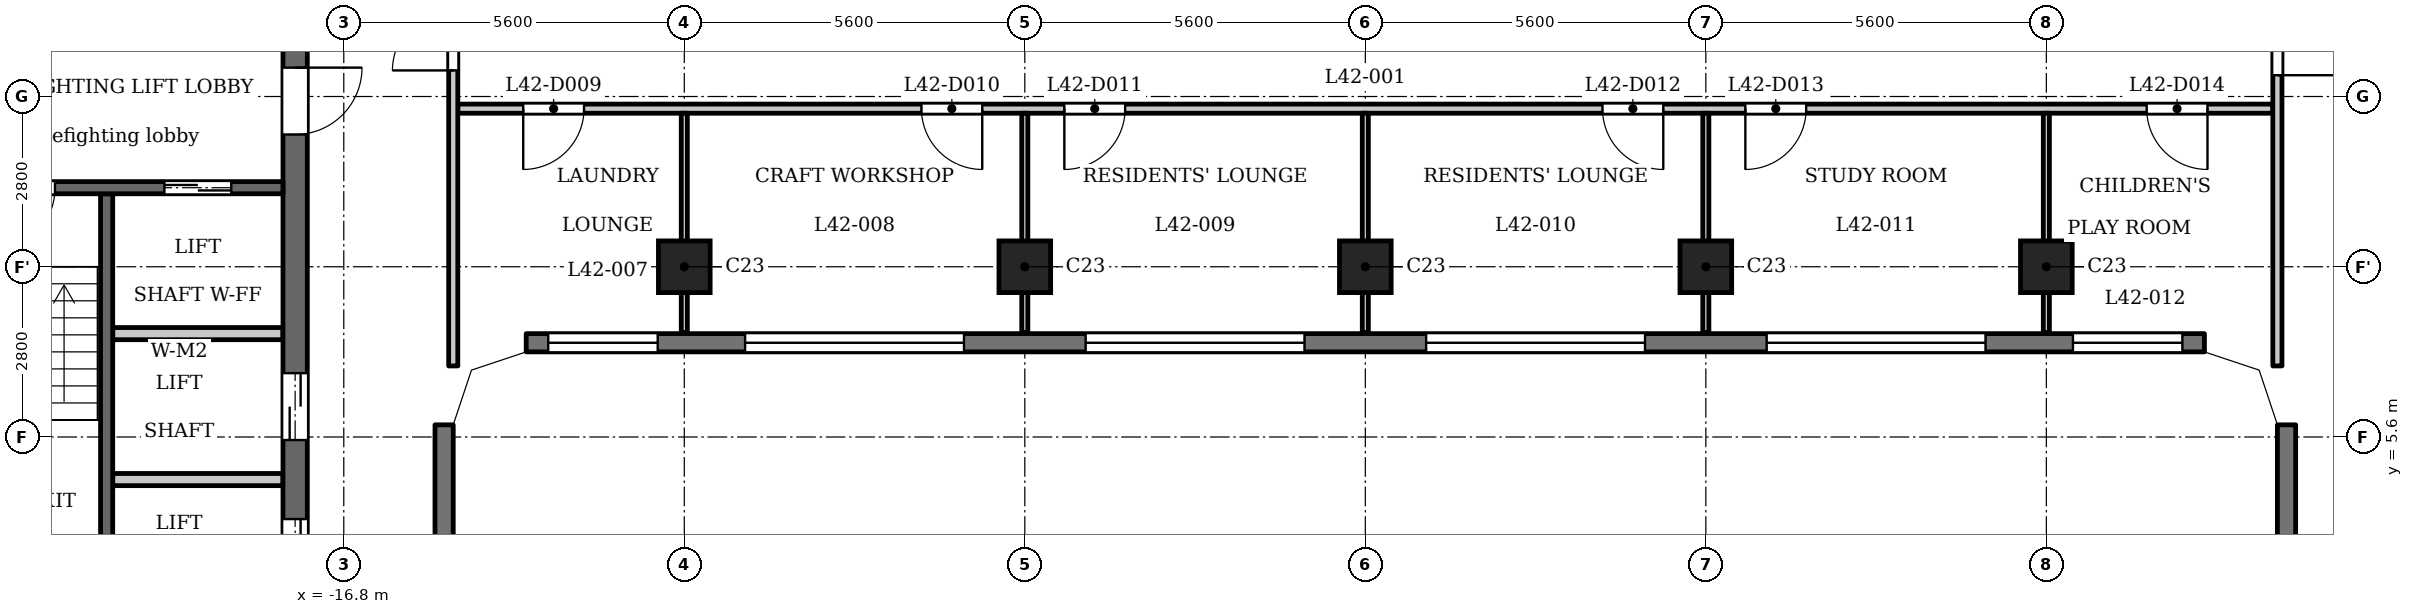
"""IFC4 building model, lengths in metres.
Left out: names, types, materials, properties, quantities, classifications, styles, units other than length and angle.
Written with IfcOpenShell. Run it as: python <this file> out.ifc"""

import sys

from ifc_helpers import new_model, si_unit, direction, frame, frame_2d, origin, origin_2d, place, context, subcontext, project, spatial, polyline, rectangle, outline, extrude, element, fill, save


model = new_model("IFC4")
c1 = context("Model", 3, precision=1e-05, world=origin(), true_north=direction((0.0, 1.0)))
c2 = subcontext(c1, "Body", "Model", "MODEL_VIEW")
j1 = project(units=[si_unit("LENGTHUNIT", "METRE"), si_unit("PLANEANGLEUNIT", "RADIAN")], contexts=[c1])
p1 = place(None, origin())
s1 = spatial("IfcSite", under=j1, at=p1, CompositionType="ELEMENT")
p2 = place(p1, origin())
s2 = spatial("IfcBuilding", under=s1, at=p2, CompositionType="ELEMENT")
p3 = place(p2, frame((0.0, 0.0, 164.1)))
s3 = spatial("IfcBuildingStorey", under=s2, at=p3, CompositionType="ELEMENT", Elevation=164.1)
for number, where, z_axis, x_axis in (
    (1, (-11.2, 8.4, 0.0), (0.0, 0.0, 1.0), (1.0, 0.0, 0.0)),
    (2, (-5.6, 8.4, 0.0), (0.0, 0.0, 1.0), (1.0, 0.0, 0.0)),
    (3, (0.0, 8.4, 0.0), (0.0, 0.0, 1.0), (1.0, 0.0, 0.0)),
    (4, (5.6, 8.4, 0.0), (0.0, 0.0, 1.0), (1.0, 0.0, 0.0)),
    (5, (11.2, 8.4, 0.0), (0.0, 0.0, 1.0), (1.0, 0.0, 0.0)),
):
    element("IfcColumn", number, at=place(p3, frame(where, z_axis=z_axis, x_axis=x_axis)), inside=s3, PredefinedType="COLUMN", context=c2, shape_type="SweptSolid", body=[
        extrude(rectangle(XDim=0.85, YDim=0.85, at=origin_2d()), origin(), (0.0, 0.0, 1.0), 3.5),
    ])
p4 = place(p3, frame((-15.15, -5.8, 0.0), z_axis=(0.0, 0.0, 1.0), x_axis=(0.0, 1.0, 0.0)))
e6 = element("IfcWall", 6, at=p4, inside=s3, PredefinedType="SOLIDWALL", context=c2, shape_type="SweptSolid", body=[
    extrude(rectangle(XDim=11.6, YDim=0.3, at=frame_2d((5.8, 0.0))), origin(), (0.0, 0.0, 1.0), 3.2),
])
p5 = place(p3, frame((-13.8, 7.15, 0.0), z_axis=(0.0, 0.0, 1.0), x_axis=(1.0, 0.0, 0.0)))
e7 = element("IfcWall", 7, at=p5, inside=s3, PredefinedType="SOLIDWALL", context=c2, shape_type="SweptSolid", body=[
    extrude(rectangle(XDim=27.6, YDim=0.3, at=frame_2d((13.8, 0.0))), origin(), (0.0, 0.0, 1.0), 3.2),
])
p6 = place(p5, frame((0.363, 0.0, 0.9)))
e8 = element("IfcOpeningElement", 8, at=p6, cuts=e7, PredefinedType="OPENING", context=c2, shape_type="SweptSolid", body=[
    extrude(rectangle(XDim=1.8, YDim=1.25, at=frame_2d((0.9, 0.625))), frame((0.0, 0.16, 0.0), z_axis=(0.0, -1.0, 0.0), x_axis=(1.0, 0.0, 0.0)), (0.0, 0.0, 1.0), 0.32),
])
p7 = place(p5, frame((3.6, 0.0, 1.2)))
e9 = element("IfcOpeningElement", 9, at=p7, cuts=e7, PredefinedType="OPENING", context=c2, shape_type="SweptSolid", body=[
    extrude(rectangle(XDim=3.6, YDim=0.95, at=frame_2d((1.8, 0.475))), frame((0.0, 0.16, 0.0), z_axis=(0.0, -1.0, 0.0), x_axis=(1.0, 0.0, 0.0)), (0.0, 0.0, 1.0), 0.32),
])
p8 = place(p5, frame((9.2, 0.0, 1.2)))
e10 = element("IfcOpeningElement", 10, at=p8, cuts=e7, PredefinedType="OPENING", context=c2, shape_type="SweptSolid", body=[
    extrude(rectangle(XDim=3.6, YDim=0.95, at=frame_2d((1.8, 0.475))), frame((0.0, 0.16, 0.0), z_axis=(0.0, -1.0, 0.0), x_axis=(1.0, 0.0, 0.0)), (0.0, 0.0, 1.0), 0.32),
])
p9 = place(p5, frame((14.8, 0.0, 1.2)))
e11 = element("IfcOpeningElement", 11, at=p9, cuts=e7, PredefinedType="OPENING", context=c2, shape_type="SweptSolid", body=[
    extrude(rectangle(XDim=3.6, YDim=0.95, at=frame_2d((1.8, 0.475))), frame((0.0, 0.16, 0.0), z_axis=(0.0, -1.0, 0.0), x_axis=(1.0, 0.0, 0.0)), (0.0, 0.0, 1.0), 0.32),
])
p10 = place(p5, frame((20.4, 0.0, 1.2)))
e12 = element("IfcOpeningElement", 12, at=p10, cuts=e7, PredefinedType="OPENING", context=c2, shape_type="SweptSolid", body=[
    extrude(rectangle(XDim=3.6, YDim=0.95, at=frame_2d((1.8, 0.475))), frame((0.0, 0.16, 0.0), z_axis=(0.0, -1.0, 0.0), x_axis=(1.0, 0.0, 0.0)), (0.0, 0.0, 1.0), 0.32),
])
p11 = place(p5, frame((25.438, 0.0, 0.9)))
e13 = element("IfcOpeningElement", 13, at=p11, cuts=e7, PredefinedType="OPENING", context=c2, shape_type="SweptSolid", body=[
    extrude(rectangle(XDim=1.8, YDim=1.25, at=frame_2d((0.9, 0.625))), frame((0.0, 0.16, 0.0), z_axis=(0.0, -1.0, 0.0), x_axis=(1.0, 0.0, 0.0)), (0.0, 0.0, 1.0), 0.32),
])
p12 = place(p3, frame((15.15, 5.8, 0.0), z_axis=(0.0, 0.0, 1.0), x_axis=(0.0, -1.0, 0.0)))
e14 = element("IfcWall", 14, at=p12, inside=s3, PredefinedType="SOLIDWALL", context=c2, shape_type="SweptSolid", body=[
    extrude(rectangle(XDim=11.6, YDim=0.3, at=frame_2d((5.8, 0.0))), origin(), (0.0, 0.0, 1.0), 3.2),
])
p13 = place(p3, frame((-20.7, 2.6, 0.0), z_axis=(0.0, 0.0, 1.0), x_axis=(0.0, 1.0, 0.0)))
e15 = element("IfcWall", 15, at=p13, inside=s3, PredefinedType="SHEAR", context=c2, shape_type="SweptSolid", body=[
    extrude(rectangle(XDim=7.0, YDim=0.2, at=frame_2d((3.5, 0.0))), origin(), (0.0, 0.0, 1.0), 3.2),
])
p14 = place(p3, frame((-17.6, -12.45, 0.0), z_axis=(0.0, 0.0, 1.0), x_axis=(0.0, 1.0, 0.0)))
e16 = element("IfcWall", 16, at=p14, inside=s3, PredefinedType="SHEAR", context=c2, shape_type="SweptSolid", body=[
    extrude(rectangle(XDim=24.9, YDim=0.4, at=frame_2d((12.45, 0.0))), origin(), (0.0, 0.0, 1.0), 3.2),
])
p15 = place(p14, frame((8.65, 0.0, 0.0)))
e17 = element("IfcOpeningElement", 17, at=p15, cuts=e16, PredefinedType="OPENING", context=c2, shape_type="SweptSolid", body=[
    extrude(rectangle(XDim=0.9, YDim=2.1, at=frame_2d((0.45, 1.05))), frame((0.0, 0.21, 0.0), z_axis=(0.0, -1.0, 0.0), x_axis=(1.0, 0.0, 0.0)), (0.0, 0.0, 1.0), 0.42),
])
p16 = place(p14, frame((15.6, 0.0, 0.0)))
e18 = element("IfcOpeningElement", 18, at=p16, cuts=e16, PredefinedType="OPENING", context=c2, shape_type="SweptSolid", body=[
    extrude(rectangle(XDim=1.1, YDim=2.1, at=frame_2d((0.55, 1.05))), frame((0.0, 0.21, 0.0), z_axis=(0.0, -1.0, 0.0), x_axis=(1.0, 0.0, 0.0)), (0.0, 0.0, 1.0), 0.42),
])
p17 = place(p14, frame((18.0, 0.0, 0.0)))
e19 = element("IfcOpeningElement", 19, at=p17, cuts=e16, PredefinedType="OPENING", context=c2, shape_type="SweptSolid", body=[
    extrude(rectangle(XDim=1.1, YDim=2.1, at=frame_2d((0.55, 1.05))), frame((0.0, 0.21, 0.0), z_axis=(0.0, -1.0, 0.0), x_axis=(1.0, 0.0, 0.0)), (0.0, 0.0, 1.0), 0.42),
])
p18 = place(p14, frame((23.025, 0.0, 0.0)))
e20 = element("IfcOpeningElement", 20, at=p18, cuts=e16, PredefinedType="OPENING", context=c2, shape_type="SweptSolid", body=[
    extrude(rectangle(XDim=1.1, YDim=2.1, at=frame_2d((0.55, 1.05))), frame((0.0, 0.21, 0.0), z_axis=(0.0, -1.0, 0.0), x_axis=(1.0, 0.0, 0.0)), (0.0, 0.0, 1.0), 0.42),
])
p19 = place(p14, frame((0.775, 0.0, 0.0)))
e21 = element("IfcOpeningElement", 21, at=p19, cuts=e16, PredefinedType="OPENING", context=c2, shape_type="SweptSolid", body=[
    extrude(rectangle(XDim=1.1, YDim=2.1, at=frame_2d((0.55, 1.05))), frame((0.0, 0.21, 0.0), z_axis=(0.0, -1.0, 0.0), x_axis=(1.0, 0.0, 0.0)), (0.0, 0.0, 1.0), 0.42),
])
p20 = place(p14, frame((12.925, 0.0, 0.0)))
e22 = element("IfcOpeningElement", 22, at=p20, cuts=e16, PredefinedType="OPENING", context=c2, shape_type="SweptSolid", body=[
    extrude(rectangle(XDim=1.8, YDim=2.1, at=frame_2d((0.9, 1.05))), frame((0.0, 0.21, 0.0), z_axis=(0.0, -1.0, 0.0), x_axis=(1.0, 0.0, 0.0)), (0.0, 0.0, 1.0), 0.42),
])
for number, where, z_axis, x_axis in (
    (23, (-17.8, 4.9, 0.0), (0.0, 0.0, 1.0), (-1.0, 0.0, 0.0)),
    (24, (-17.8, 7.3, 0.0), (0.0, 0.0, 1.0), (-1.0, 0.0, 0.0)),
):
    element("IfcWall", number, at=place(p3, frame(where, z_axis=z_axis, x_axis=x_axis)), inside=s3, PredefinedType="PARTITIONING", context=c2, shape_type="SweptSolid", body=[
        extrude(rectangle(XDim=2.8, YDim=0.2, at=frame_2d((1.4, 0.0))), origin(), (0.0, 0.0, 1.0), 3.2),
    ])
p21 = place(p3, frame((-17.8, 9.7, 0.0), z_axis=(0.0, 0.0, 1.0), x_axis=(-1.0, 0.0, 0.0)))
e25 = element("IfcWall", 25, at=p21, inside=s3, PredefinedType="SHEAR", context=c2, shape_type="SweptSolid", body=[
    extrude(rectangle(XDim=8.45, YDim=0.2, at=frame_2d((4.225, 0.0))), origin(), (0.0, 0.0, 1.0), 3.2),
])
p22 = place(p21, frame((0.85, 0.0, 0.0)))
e26 = element("IfcOpeningElement", 26, at=p22, cuts=e25, PredefinedType="OPENING", context=c2, shape_type="SweptSolid", body=[
    extrude(rectangle(XDim=1.1, YDim=2.1, at=frame_2d((0.55, 1.05))), frame((0.0, 0.11, 0.0), z_axis=(0.0, -1.0, 0.0), x_axis=(1.0, 0.0, 0.0)), (0.0, 0.0, 1.0), 0.22),
])
p23 = place(p21, frame((3.75, 0.0, 0.0)))
e27 = element("IfcOpeningElement", 27, at=p23, cuts=e25, PredefinedType="OPENING", context=c2, shape_type="SweptSolid", body=[
    extrude(rectangle(XDim=1.1, YDim=2.1, at=frame_2d((0.55, 1.05))), frame((0.0, 0.11, 0.0), z_axis=(0.0, -1.0, 0.0), x_axis=(1.0, 0.0, 0.0)), (0.0, 0.0, 1.0), 0.22),
])
p24 = place(p3, frame((-14.925, 11.0, 0.0), z_axis=(0.0, 0.0, 1.0), x_axis=(1.0, 0.0, 0.0)))
e28 = element("IfcWall", 28, at=p24, inside=s3, PredefinedType="PARTITIONING", context=c2, shape_type="SweptSolid", body=[
    extrude(rectangle(XDim=29.85, YDim=0.15, at=frame_2d((14.925, 0.0))), origin(), (0.0, 0.0, 1.0), 3.2),
])
p25 = place(p24, frame((1.076, 0.0, 0.0)))
e29 = element("IfcOpeningElement", 29, at=p25, cuts=e28, PredefinedType="OPENING", context=c2, shape_type="SweptSolid", body=[
    extrude(rectangle(XDim=1.0, YDim=2.1, at=frame_2d((0.5, 1.05))), frame((0.0, 0.085, 0.0), z_axis=(0.0, -1.0, 0.0), x_axis=(1.0, 0.0, 0.0)), (0.0, 0.0, 1.0), 0.17),
])
p26 = place(p24, frame((7.625, 0.0, 0.0)))
e30 = element("IfcOpeningElement", 30, at=p26, cuts=e28, PredefinedType="OPENING", context=c2, shape_type="SweptSolid", body=[
    extrude(rectangle(XDim=1.0, YDim=2.1, at=frame_2d((0.5, 1.05))), frame((0.0, 0.085, 0.0), z_axis=(0.0, -1.0, 0.0), x_axis=(1.0, 0.0, 0.0)), (0.0, 0.0, 1.0), 0.17),
])
p27 = place(p24, frame((9.975, 0.0, 0.0)))
e31 = element("IfcOpeningElement", 31, at=p27, cuts=e28, PredefinedType="OPENING", context=c2, shape_type="SweptSolid", body=[
    extrude(rectangle(XDim=1.0, YDim=2.1, at=frame_2d((0.5, 1.05))), frame((0.0, 0.085, 0.0), z_axis=(0.0, -1.0, 0.0), x_axis=(1.0, 0.0, 0.0)), (0.0, 0.0, 1.0), 0.17),
])
p28 = place(p24, frame((18.825, 0.0, 0.0)))
e32 = element("IfcOpeningElement", 32, at=p28, cuts=e28, PredefinedType="OPENING", context=c2, shape_type="SweptSolid", body=[
    extrude(rectangle(XDim=1.0, YDim=2.1, at=frame_2d((0.5, 1.05))), frame((0.0, 0.085, 0.0), z_axis=(0.0, -1.0, 0.0), x_axis=(1.0, 0.0, 0.0)), (0.0, 0.0, 1.0), 0.17),
])
p29 = place(p24, frame((21.175, 0.0, 0.0)))
e33 = element("IfcOpeningElement", 33, at=p29, cuts=e28, PredefinedType="OPENING", context=c2, shape_type="SweptSolid", body=[
    extrude(rectangle(XDim=1.0, YDim=2.1, at=frame_2d((0.5, 1.05))), frame((0.0, 0.085, 0.0), z_axis=(0.0, -1.0, 0.0), x_axis=(1.0, 0.0, 0.0)), (0.0, 0.0, 1.0), 0.17),
])
p30 = place(p24, frame((27.775, 0.0, 0.0)))
e34 = element("IfcOpeningElement", 34, at=p30, cuts=e28, PredefinedType="OPENING", context=c2, shape_type="SweptSolid", body=[
    extrude(rectangle(XDim=1.0, YDim=2.1, at=frame_2d((0.5, 1.05))), frame((0.0, 0.085, 0.0), z_axis=(0.0, -1.0, 0.0), x_axis=(1.0, 0.0, 0.0)), (0.0, 0.0, 1.0), 0.17),
])
p31 = place(p3, frame((-15.0, 6.769, 0.0), z_axis=(0.0, 0.0, 1.0), x_axis=(0.0, 1.0, 0.0)))
e35 = element("IfcWall", 35, at=p31, inside=s3, PredefinedType="PARTITIONING", context=c2, shape_type="SweptSolid", body=[
    extrude(rectangle(XDim=6.356, YDim=0.15, at=frame_2d((3.178, 0.0))), origin(), (0.0, 0.0, 1.0), 3.2),
])
p32 = place(p31, frame((4.86, 0.0, 0.0)))
e36 = element("IfcOpeningElement", 36, at=p32, cuts=e35, PredefinedType="OPENING", context=c2, shape_type="SweptSolid", body=[
    extrude(rectangle(XDim=1.0, YDim=2.1, at=frame_2d((0.5, 1.05))), frame((0.0, 0.085, 0.0), z_axis=(0.0, -1.0, 0.0), x_axis=(1.0, 0.0, 0.0)), (0.0, 0.0, 1.0), 0.17),
])
for number, where, z_axis, x_axis in (
    (37, (-11.2, 7.32, 0.0), (0.0, 0.0, 1.0), (0.0, 1.0, 0.0)),
    (38, (-5.6, 7.32, 0.0), (0.0, 0.0, 1.0), (0.0, 1.0, 0.0)),
    (39, (0.0, 7.32, 0.0), (0.0, 0.0, 1.0), (0.0, 1.0, 0.0)),
    (40, (5.6, 7.32, 0.0), (0.0, 0.0, 1.0), (0.0, 1.0, 0.0)),
    (41, (11.2, 7.32, 0.0), (0.0, 0.0, 1.0), (0.0, 1.0, 0.0)),
):
    element("IfcWall", number, at=place(p3, frame(where, z_axis=z_axis, x_axis=x_axis)), inside=s3, PredefinedType="PARTITIONING", context=c2, shape_type="SweptSolid", body=[
        extrude(rectangle(XDim=3.605, YDim=0.1, at=frame_2d((1.802, 0.0))), origin(), (0.0, 0.0, 1.0), 3.2),
    ])
p33 = place(p3, frame((15.0, 6.769, 0.0), z_axis=(0.0, 0.0, 1.0), x_axis=(0.0, 1.0, 0.0)))
e42 = element("IfcWall", 42, at=p33, inside=s3, PredefinedType="PARTITIONING", context=c2, shape_type="SweptSolid", body=[
    extrude(rectangle(XDim=6.356, YDim=0.15, at=frame_2d((3.178, 0.0))), origin(), (0.0, 0.0, 1.0), 3.2),
])
p34 = place(p33, frame((4.781, 0.0, 0.0)))
e43 = element("IfcOpeningElement", 43, at=p34, cuts=e42, PredefinedType="OPENING", context=c2, shape_type="SweptSolid", body=[
    extrude(rectangle(XDim=1.0, YDim=2.1, at=frame_2d((0.5, 1.05))), frame((0.0, 0.085, 0.0), z_axis=(0.0, -1.0, 0.0), x_axis=(1.0, 0.0, 0.0)), (0.0, 0.0, 1.0), 0.17),
])
p35 = place(p3, origin())
e44 = element("IfcWall", 44, at=p35, inside=s3, PredefinedType="SOLIDWALL", context=c2, shape_type="SweptSolid", body=[
    extrude(outline(polyline([(-13.849, 7.3), (-14.937, 6.937), (-15.3, 5.849), (-15.3, 5.8), (-15.0, 5.8), (-14.7, 6.7), (-13.8, 7.0), (-13.8, 7.3), (-13.849, 7.3)])), origin(), (0.0, 0.0, 1.0), 3.2),
])
e45 = element("IfcWall", 45, at=p35, inside=s3, PredefinedType="SOLIDWALL", context=c2, shape_type="SweptSolid", body=[
    extrude(outline(polyline([(14.937, 6.937), (13.849, 7.3), (13.8, 7.3), (13.8, 7.0), (14.7, 6.7), (15.0, 5.8), (15.3, 5.8), (15.3, 5.849), (14.937, 6.937)])), origin(), (0.0, 0.0, 1.0), 3.2),
])
p36 = place(p16, origin())
e46 = element("IfcDoor", 46, at=p36, inside=s3, OperationType="DOUBLE_DOOR_SLIDING", PredefinedType="DOOR", context=c2, shape_type="SweptSolid", body=[
    extrude(rectangle(XDim=1.1, YDim=2.1, at=frame_2d((0.55, 1.05))), frame((0.0, 0.025, 0.0), z_axis=(0.0, -1.0, 0.0), x_axis=(1.0, 0.0, 0.0)), (0.0, 0.0, 1.0), 0.05),
])
fill(e18, e46)
p37 = place(p17, origin())
e47 = element("IfcDoor", 47, at=p37, inside=s3, OperationType="DOUBLE_DOOR_SLIDING", PredefinedType="DOOR", context=c2, shape_type="SweptSolid", body=[
    extrude(rectangle(XDim=1.1, YDim=2.1, at=frame_2d((0.55, 1.05))), frame((0.0, 0.025, 0.0), z_axis=(0.0, -1.0, 0.0), x_axis=(1.0, 0.0, 0.0)), (0.0, 0.0, 1.0), 0.05),
])
fill(e19, e47)
p38 = place(p22, origin())
e48 = element("IfcDoor", 48, at=p38, inside=s3, OperationType="DOUBLE_DOOR_SLIDING", PredefinedType="DOOR", context=c2, shape_type="SweptSolid", body=[
    extrude(rectangle(XDim=1.1, YDim=2.1, at=frame_2d((0.55, 1.05))), frame((0.0, 0.025, 0.0), z_axis=(0.0, -1.0, 0.0), x_axis=(1.0, 0.0, 0.0)), (0.0, 0.0, 1.0), 0.05),
])
fill(e26, e48)
p39 = place(p18, origin())
e49 = element("IfcDoor", 49, at=p39, inside=s3, OperationType="SINGLE_SWING_RIGHT", PredefinedType="DOOR", context=c2, shape_type="SweptSolid", body=[
    extrude(rectangle(XDim=1.1, YDim=2.1, at=frame_2d((0.55, 1.05))), frame((0.0, 0.025, 0.0), z_axis=(0.0, -1.0, 0.0), x_axis=(1.0, 0.0, 0.0)), (0.0, 0.0, 1.0), 0.05),
])
fill(e20, e49)
p40 = place(p23, origin())
e50 = element("IfcDoor", 50, at=p40, inside=s3, OperationType="SINGLE_SWING_LEFT", PredefinedType="DOOR", context=c2, shape_type="SweptSolid", body=[
    extrude(rectangle(XDim=1.1, YDim=2.1, at=frame_2d((0.55, 1.05))), frame((0.0, 0.025, 0.0), z_axis=(0.0, -1.0, 0.0), x_axis=(1.0, 0.0, 0.0)), (0.0, 0.0, 1.0), 0.05),
])
fill(e27, e50)
p41 = place(p32, origin())
e51 = element("IfcDoor", 51, at=p41, inside=s3, OperationType="SINGLE_SWING_RIGHT", PredefinedType="DOOR", context=c2, shape_type="SweptSolid", body=[
    extrude(rectangle(XDim=1.0, YDim=2.1, at=frame_2d((0.5, 1.05))), frame((0.0, 0.025, 0.0), z_axis=(0.0, -1.0, 0.0), x_axis=(1.0, 0.0, 0.0)), (0.0, 0.0, 1.0), 0.05),
])
fill(e36, e51)
p42 = place(p34, origin())
e52 = element("IfcDoor", 52, at=p42, inside=s3, OperationType="SINGLE_SWING_LEFT", PredefinedType="DOOR", context=c2, shape_type="SweptSolid", body=[
    extrude(rectangle(XDim=1.0, YDim=2.1, at=frame_2d((0.5, 1.05))), frame((0.0, 0.025, 0.0), z_axis=(0.0, -1.0, 0.0), x_axis=(1.0, 0.0, 0.0)), (0.0, 0.0, 1.0), 0.05),
])
fill(e43, e52)
p43 = place(p25, origin())
e53 = element("IfcDoor", 53, at=p43, inside=s3, OperationType="SINGLE_SWING_LEFT", PredefinedType="DOOR", context=c2, shape_type="SweptSolid", body=[
    extrude(rectangle(XDim=1.0, YDim=2.1, at=frame_2d((0.5, 1.05))), frame((0.0, 0.025, 0.0), z_axis=(0.0, -1.0, 0.0), x_axis=(1.0, 0.0, 0.0)), (0.0, 0.0, 1.0), 0.05),
])
fill(e29, e53)
p44 = place(p26, origin())
e54 = element("IfcDoor", 54, at=p44, inside=s3, OperationType="SINGLE_SWING_RIGHT", PredefinedType="DOOR", context=c2, shape_type="SweptSolid", body=[
    extrude(rectangle(XDim=1.0, YDim=2.1, at=frame_2d((0.5, 1.05))), frame((0.0, 0.025, 0.0), z_axis=(0.0, -1.0, 0.0), x_axis=(1.0, 0.0, 0.0)), (0.0, 0.0, 1.0), 0.05),
])
fill(e30, e54)
p45 = place(p27, origin())
e55 = element("IfcDoor", 55, at=p45, inside=s3, OperationType="SINGLE_SWING_LEFT", PredefinedType="DOOR", context=c2, shape_type="SweptSolid", body=[
    extrude(rectangle(XDim=1.0, YDim=2.1, at=frame_2d((0.5, 1.05))), frame((0.0, 0.025, 0.0), z_axis=(0.0, -1.0, 0.0), x_axis=(1.0, 0.0, 0.0)), (0.0, 0.0, 1.0), 0.05),
])
fill(e31, e55)
p46 = place(p28, origin())
e56 = element("IfcDoor", 56, at=p46, inside=s3, OperationType="SINGLE_SWING_RIGHT", PredefinedType="DOOR", context=c2, shape_type="SweptSolid", body=[
    extrude(rectangle(XDim=1.0, YDim=2.1, at=frame_2d((0.5, 1.05))), frame((0.0, 0.025, 0.0), z_axis=(0.0, -1.0, 0.0), x_axis=(1.0, 0.0, 0.0)), (0.0, 0.0, 1.0), 0.05),
])
fill(e32, e56)
p47 = place(p29, origin())
e57 = element("IfcDoor", 57, at=p47, inside=s3, OperationType="SINGLE_SWING_LEFT", PredefinedType="DOOR", context=c2, shape_type="SweptSolid", body=[
    extrude(rectangle(XDim=1.0, YDim=2.1, at=frame_2d((0.5, 1.05))), frame((0.0, 0.025, 0.0), z_axis=(0.0, -1.0, 0.0), x_axis=(1.0, 0.0, 0.0)), (0.0, 0.0, 1.0), 0.05),
])
fill(e33, e57)
p48 = place(p30, origin())
e58 = element("IfcDoor", 58, at=p48, inside=s3, OperationType="SINGLE_SWING_RIGHT", PredefinedType="DOOR", context=c2, shape_type="SweptSolid", body=[
    extrude(rectangle(XDim=1.0, YDim=2.1, at=frame_2d((0.5, 1.05))), frame((0.0, 0.025, 0.0), z_axis=(0.0, -1.0, 0.0), x_axis=(1.0, 0.0, 0.0)), (0.0, 0.0, 1.0), 0.05),
])
fill(e34, e58)
p49 = place(p6, origin())
e59 = element("IfcWindow", 59, at=p49, inside=s3, PartitioningType="SINGLE_PANEL", PredefinedType="WINDOW", context=c2, shape_type="SweptSolid", body=[
    extrude(rectangle(XDim=1.8, YDim=1.25, at=frame_2d((0.9, 0.625))), frame((0.0, 0.03, 0.0), z_axis=(0.0, -1.0, 0.0), x_axis=(1.0, 0.0, 0.0)), (0.0, 0.0, 1.0), 0.06),
])
fill(e8, e59)
p50 = place(p7, origin())
e60 = element("IfcWindow", 60, at=p50, inside=s3, PartitioningType="SINGLE_PANEL", PredefinedType="WINDOW", context=c2, shape_type="SweptSolid", body=[
    extrude(rectangle(XDim=3.6, YDim=0.95, at=frame_2d((1.8, 0.475))), frame((0.0, 0.03, 0.0), z_axis=(0.0, -1.0, 0.0), x_axis=(1.0, 0.0, 0.0)), (0.0, 0.0, 1.0), 0.06),
])
fill(e9, e60)
p51 = place(p8, origin())
e61 = element("IfcWindow", 61, at=p51, inside=s3, PartitioningType="SINGLE_PANEL", PredefinedType="WINDOW", context=c2, shape_type="SweptSolid", body=[
    extrude(rectangle(XDim=3.6, YDim=0.95, at=frame_2d((1.8, 0.475))), frame((0.0, 0.03, 0.0), z_axis=(0.0, -1.0, 0.0), x_axis=(1.0, 0.0, 0.0)), (0.0, 0.0, 1.0), 0.06),
])
fill(e10, e61)
p52 = place(p9, origin())
e62 = element("IfcWindow", 62, at=p52, inside=s3, PartitioningType="SINGLE_PANEL", PredefinedType="WINDOW", context=c2, shape_type="SweptSolid", body=[
    extrude(rectangle(XDim=3.6, YDim=0.95, at=frame_2d((1.8, 0.475))), frame((0.0, 0.03, 0.0), z_axis=(0.0, -1.0, 0.0), x_axis=(1.0, 0.0, 0.0)), (0.0, 0.0, 1.0), 0.06),
])
fill(e11, e62)
p53 = place(p10, origin())
e63 = element("IfcWindow", 63, at=p53, inside=s3, PartitioningType="SINGLE_PANEL", PredefinedType="WINDOW", context=c2, shape_type="SweptSolid", body=[
    extrude(rectangle(XDim=3.6, YDim=0.95, at=frame_2d((1.8, 0.475))), frame((0.0, 0.03, 0.0), z_axis=(0.0, -1.0, 0.0), x_axis=(1.0, 0.0, 0.0)), (0.0, 0.0, 1.0), 0.06),
])
fill(e12, e63)
p54 = place(p11, origin())
e64 = element("IfcWindow", 64, at=p54, inside=s3, PartitioningType="SINGLE_PANEL", PredefinedType="WINDOW", context=c2, shape_type="SweptSolid", body=[
    extrude(rectangle(XDim=1.8, YDim=1.25, at=frame_2d((0.9, 0.625))), frame((0.0, 0.03, 0.0), z_axis=(0.0, -1.0, 0.0), x_axis=(1.0, 0.0, 0.0)), (0.0, 0.0, 1.0), 0.06),
])
fill(e13, e64)
save(model, sys.argv[1])
